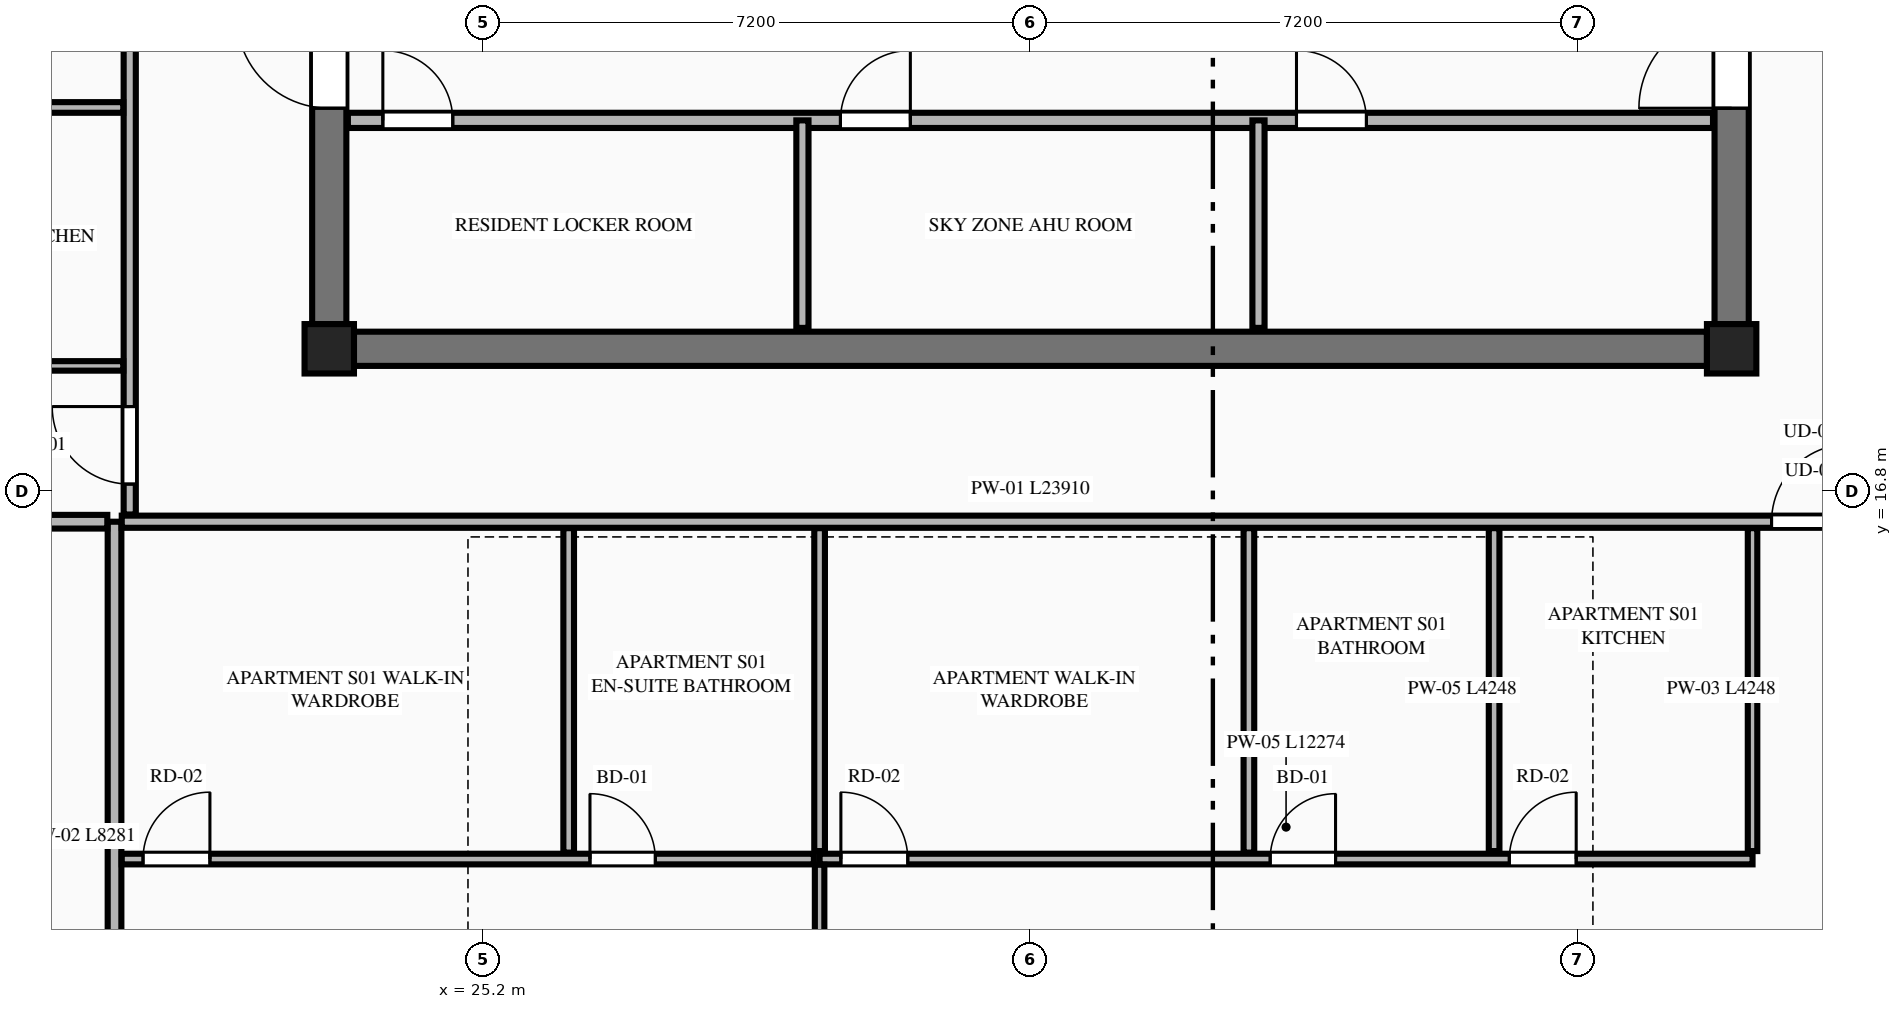
"""IFC4 building model, lengths in metres.
Left out: names, types, materials, properties, quantities, classifications, styles, units other than length and angle.
Written with IfcOpenShell. Run it as: python <this file> out.ifc"""

import sys

from ifc_helpers import new_model, si_unit, direction, frame, frame_2d, origin, origin_2d, place, context, subcontext, project, spatial, rectangle, extrude, element, fill, save


model = new_model("IFC4")
c1 = context("Model", 3, precision=1e-05, world=origin(), true_north=direction((0.0, 1.0)))
c2 = subcontext(c1, "Body", "Model", "MODEL_VIEW")
j1 = project(units=[si_unit("LENGTHUNIT", "METRE"), si_unit("PLANEANGLEUNIT", "RADIAN")], contexts=[c1])
p1 = place(None, origin())
s1 = spatial("IfcSite", under=j1, at=p1, CompositionType="ELEMENT")
p2 = place(p1, origin())
s2 = spatial("IfcBuilding", under=s1, at=p2, CompositionType="ELEMENT")
p3 = place(p2, frame((0.0, 0.0, 287.5)))
s3 = spatial("IfcBuildingStorey", under=s2, at=p3, CompositionType="ELEMENT", Elevation=287.5)
for number, where, z_axis, x_axis in (
    (1, (23.175, 18.675, 0.0), (0.0, 0.0, 1.0), (1.0, 0.0, 0.0)),
    (2, (41.625, 18.675, 0.0), (0.0, 0.0, 1.0), (1.0, 0.0, 0.0)),
):
    element("IfcColumn", number, at=place(p3, frame(where, z_axis=z_axis, x_axis=x_axis)), inside=s3, PredefinedType="COLUMN", context=c2, shape_type="SweptSolid", body=[
        extrude(rectangle(XDim=0.65, YDim=0.65, at=origin_2d()), origin(), (0.0, 0.0, 1.0), 4.0),
    ])
p4 = place(p3, frame((23.5, 18.675, 0.0), z_axis=(0.0, 0.0, 1.0), x_axis=(1.0, 0.0, 0.0)))
e3 = element("IfcWall", 3, at=p4, inside=s3, PredefinedType="SHEAR", context=c2, shape_type="SweptSolid", body=[
    extrude(rectangle(XDim=17.8, YDim=0.45, at=frame_2d((8.9, 0.0))), origin(), (0.0, 0.0, 1.0), 3.8),
])
p5 = place(p3, frame((23.175, 19.0, 0.0), z_axis=(0.0, 0.0, 1.0), x_axis=(0.0, 1.0, 0.0)))
e4 = element("IfcWall", 4, at=p5, inside=s3, PredefinedType="SHEAR", context=c2, shape_type="SweptSolid", body=[
    extrude(rectangle(XDim=13.8, YDim=0.45, at=frame_2d((6.9, 0.0))), origin(), (0.0, 0.0, 1.0), 3.8),
])
p6 = place(p5, frame((2.84, 0.0, 0.0)))
e5 = element("IfcOpeningElement", 5, at=p6, cuts=e4, PredefinedType="OPENING", context=c2, shape_type="SweptSolid", body=[
    extrude(rectangle(XDim=1.22, YDim=2.25, at=frame_2d((0.61, 1.125))), frame((0.0, 0.235, 0.0), z_axis=(0.0, -1.0, 0.0), x_axis=(1.0, 0.0, 0.0)), (0.0, 0.0, 1.0), 0.47),
])
p7 = place(p3, frame((41.625, 19.0, 0.0), z_axis=(0.0, 0.0, 1.0), x_axis=(0.0, 1.0, 0.0)))
e6 = element("IfcWall", 6, at=p7, inside=s3, PredefinedType="SHEAR", context=c2, shape_type="SweptSolid", body=[
    extrude(rectangle(XDim=13.8, YDim=0.45, at=frame_2d((6.9, 0.0))), origin(), (0.0, 0.0, 1.0), 3.8),
])
p8 = place(p7, frame((2.84, 0.0, 0.0)))
e7 = element("IfcOpeningElement", 7, at=p8, cuts=e6, PredefinedType="OPENING", context=c2, shape_type="SweptSolid", body=[
    extrude(rectangle(XDim=1.22, YDim=2.25, at=frame_2d((0.61, 1.125))), frame((0.0, 0.235, 0.0), z_axis=(0.0, -1.0, 0.0), x_axis=(1.0, 0.0, 0.0)), (0.0, 0.0, 1.0), 0.47),
])
p9 = place(p3, frame((23.42, 21.68, 0.0), z_axis=(0.0, 0.0, 1.0), x_axis=(1.0, 0.0, 0.0)))
e8 = element("IfcWall", 8, at=p9, inside=s3, PredefinedType="PLUMBINGWALL", context=c2, shape_type="SweptSolid", body=[
    extrude(rectangle(XDim=17.96, YDim=0.2, at=frame_2d((8.98, 0.0))), origin(), (0.0, 0.0, 1.0), 3.8),
])
p10 = place(p9, frame((0.46, 0.0, 0.0)))
e9 = element("IfcOpeningElement", 9, at=p10, cuts=e8, PredefinedType="OPENING", context=c2, shape_type="SweptSolid", body=[
    extrude(rectangle(XDim=0.92, YDim=2.15, at=frame_2d((0.46, 1.075))), frame((0.0, 0.11, 0.0), z_axis=(0.0, -1.0, 0.0), x_axis=(1.0, 0.0, 0.0)), (0.0, 0.0, 1.0), 0.22),
])
p11 = place(p9, frame((6.48, 0.0, 0.0)))
e10 = element("IfcOpeningElement", 10, at=p11, cuts=e8, PredefinedType="OPENING", context=c2, shape_type="SweptSolid", body=[
    extrude(rectangle(XDim=0.92, YDim=2.15, at=frame_2d((0.46, 1.075))), frame((0.0, 0.11, 0.0), z_axis=(0.0, -1.0, 0.0), x_axis=(1.0, 0.0, 0.0)), (0.0, 0.0, 1.0), 0.22),
])
p12 = place(p9, frame((12.48, 0.0, 0.0)))
e11 = element("IfcOpeningElement", 11, at=p12, cuts=e8, PredefinedType="OPENING", context=c2, shape_type="SweptSolid", body=[
    extrude(rectangle(XDim=0.92, YDim=2.15, at=frame_2d((0.46, 1.075))), frame((0.0, 0.11, 0.0), z_axis=(0.0, -1.0, 0.0), x_axis=(1.0, 0.0, 0.0)), (0.0, 0.0, 1.0), 0.22),
])
for number, where, z_axis, x_axis in (
    (12, (29.4, 18.95, 0.0), (0.0, 0.0, 1.0), (0.0, 1.0, 0.0)),
    (13, (35.4, 18.95, 0.0), (0.0, 0.0, 1.0), (0.0, 1.0, 0.0)),
):
    element("IfcWall", number, at=place(p3, frame(where, z_axis=z_axis, x_axis=x_axis)), inside=s3, PredefinedType="PARTITIONING", context=c2, shape_type="SweptSolid", body=[
        extrude(rectangle(XDim=2.73, YDim=0.16, at=frame_2d((1.365, 0.0))), origin(), (0.0, 0.0, 1.0), 3.8),
    ])
p13 = place(p3, frame((20.35, 8.119, 0.0), z_axis=(0.0, 0.0, 1.0), x_axis=(0.0, 1.0, 0.0)))
e14 = element("IfcWall", 14, at=p13, inside=s3, PredefinedType="PARTITIONING", context=c2, shape_type="SweptSolid", body=[
    extrude(rectangle(XDim=8.281, YDim=0.18, at=frame_2d((4.141, 0.0))), origin(), (0.0, 0.0, 1.0), 3.8),
])
p14 = place(p3, frame((20.445, 16.4, 0.0), z_axis=(0.0, 0.0, 1.0), x_axis=(1.0, 0.0, 0.0)))
e15 = element("IfcWall", 15, at=p14, inside=s3, PredefinedType="PARTITIONING", context=c2, shape_type="SweptSolid", body=[
    extrude(rectangle(XDim=23.91, YDim=0.16, at=frame_2d((11.955, 0.0))), origin(), (0.0, 0.0, 1.0), 3.8),
])
p15 = place(p14, frame((21.705, 0.0, 0.0)))
e16 = element("IfcOpeningElement", 16, at=p15, cuts=e15, PredefinedType="OPENING", context=c2, shape_type="SweptSolid", body=[
    extrude(rectangle(XDim=1.02, YDim=2.25, at=frame_2d((0.51, 1.125))), frame((0.0, 0.09, 0.0), z_axis=(0.0, -1.0, 0.0), x_axis=(1.0, 0.0, 0.0)), (0.0, 0.0, 1.0), 0.18),
])
p16 = place(p3, frame((41.9, 12.067, 0.0), z_axis=(0.0, 0.0, 1.0), x_axis=(0.0, 1.0, 0.0)))
e17 = element("IfcWall", 17, at=p16, inside=s3, PredefinedType="PARTITIONING", context=c2, shape_type="SweptSolid", body=[
    extrude(rectangle(XDim=4.248, YDim=0.125, at=frame_2d((2.124, 0.0))), origin(), (0.0, 0.0, 1.0), 3.257),
])
p17 = place(p3, frame((29.626, 11.962, 0.0), z_axis=(0.0, 0.0, 1.0), x_axis=(1.0, 0.0, 0.0)))
e18 = element("IfcWall", 18, at=p17, inside=s3, PredefinedType="PLUMBINGWALL", context=c2, shape_type="SweptSolid", body=[
    extrude(rectangle(XDim=12.274, YDim=0.14, at=frame_2d((6.137, 0.0))), origin(), (0.0, 0.0, 1.0), 3.8),
])
p18 = place(p17, frame((0.28, 0.0, 0.0)))
e19 = element("IfcOpeningElement", 19, at=p18, cuts=e18, PredefinedType="OPENING", context=c2, shape_type="SweptSolid", body=[
    extrude(rectangle(XDim=0.88, YDim=2.15, at=frame_2d((0.44, 1.075))), frame((0.0, 0.08, 0.0), z_axis=(0.0, -1.0, 0.0), x_axis=(1.0, 0.0, 0.0)), (0.0, 0.0, 1.0), 0.16),
])
p19 = place(p17, frame((5.928, 0.0, 0.0)))
e20 = element("IfcOpeningElement", 20, at=p19, cuts=e18, PredefinedType="OPENING", context=c2, shape_type="SweptSolid", body=[
    extrude(rectangle(XDim=0.86, YDim=2.1, at=frame_2d((0.43, 1.05))), frame((0.0, 0.08, 0.0), z_axis=(0.0, -1.0, 0.0), x_axis=(1.0, 0.0, 0.0)), (0.0, 0.0, 1.0), 0.16),
])
p20 = place(p17, frame((9.074, 0.0, 0.0)))
e21 = element("IfcOpeningElement", 21, at=p20, cuts=e18, PredefinedType="OPENING", context=c2, shape_type="SweptSolid", body=[
    extrude(rectangle(XDim=0.88, YDim=2.15, at=frame_2d((0.44, 1.075))), frame((0.0, 0.08, 0.0), z_axis=(0.0, -1.0, 0.0), x_axis=(1.0, 0.0, 0.0)), (0.0, 0.0, 1.0), 0.16),
])
p21 = place(p3, frame((20.445, 11.962, 0.0), z_axis=(0.0, 0.0, 1.0), x_axis=(1.0, 0.0, 0.0)))
e22 = element("IfcWall", 22, at=p21, inside=s3, PredefinedType="PLUMBINGWALL", context=c2, shape_type="SweptSolid", body=[
    extrude(rectangle(XDim=9.106, YDim=0.14, at=frame_2d((4.553, 0.0))), origin(), (0.0, 0.0, 1.0), 3.8),
])
p22 = place(p21, frame((0.28, 0.0, 0.0)))
e23 = element("IfcOpeningElement", 23, at=p22, cuts=e22, PredefinedType="OPENING", context=c2, shape_type="SweptSolid", body=[
    extrude(rectangle(XDim=0.88, YDim=2.15, at=frame_2d((0.44, 1.075))), frame((0.0, 0.08, 0.0), z_axis=(0.0, -1.0, 0.0), x_axis=(1.0, 0.0, 0.0)), (0.0, 0.0, 1.0), 0.16),
])
p23 = place(p21, frame((6.16, 0.0, 0.0)))
e24 = element("IfcOpeningElement", 24, at=p23, cuts=e22, PredefinedType="OPENING", context=c2, shape_type="SweptSolid", body=[
    extrude(rectangle(XDim=0.86, YDim=2.1, at=frame_2d((0.43, 1.05))), frame((0.0, 0.08, 0.0), z_axis=(0.0, -1.0, 0.0), x_axis=(1.0, 0.0, 0.0)), (0.0, 0.0, 1.0), 0.16),
])
for number, where, z_axis, x_axis in (
    (25, (38.5, 12.067, 0.0), (0.0, 0.0, 1.0), (0.0, 1.0, 0.0)),
    (26, (29.626, 12.067, 0.0), (0.0, 0.0, 1.0), (0.0, 1.0, 0.0)),
):
    element("IfcWall", number, at=place(p3, frame(where, z_axis=z_axis, x_axis=x_axis)), inside=s3, PredefinedType="PLUMBINGWALL", context=c2, shape_type="SweptSolid", body=[
        extrude(rectangle(XDim=4.248, YDim=0.14, at=frame_2d((2.124, 0.0))), origin(), (0.0, 0.0, 1.0), 3.8),
    ])
p24 = place(p3, frame((29.626, 7.315, 0.0), z_axis=(0.0, 0.0, 1.0), x_axis=(0.0, 1.0, 0.0)))
e27 = element("IfcWall", 27, at=p24, inside=s3, PredefinedType="PARTITIONING", context=c2, shape_type="SweptSolid", body=[
    extrude(rectangle(XDim=4.572, YDim=0.125, at=frame_2d((2.286, 0.0))), origin(), (0.0, 0.0, 1.0), 3.8),
])
p25 = place(p24, frame((1.05, 0.0, 0.0)))
e28 = element("IfcOpeningElement", 28, at=p25, cuts=e27, PredefinedType="OPENING", context=c2, shape_type="SweptSolid", body=[
    extrude(rectangle(XDim=0.92, YDim=2.15, at=frame_2d((0.46, 1.075))), frame((0.0, 0.073, 0.0), z_axis=(0.0, -1.0, 0.0), x_axis=(1.0, 0.0, 0.0)), (0.0, 0.0, 1.0), 0.145),
])
for number, where, z_axis, x_axis in (
    (29, (35.274, 12.047, 0.0), (0.0, 0.0, 1.0), (0.0, 1.0, 0.0)),
    (30, (26.325, 12.047, 0.0), (0.0, 0.0, 1.0), (0.0, 1.0, 0.0)),
):
    element("IfcWall", number, at=place(p3, frame(where, z_axis=z_axis, x_axis=x_axis)), inside=s3, PredefinedType="PLUMBINGWALL", context=c2, shape_type="SweptSolid", body=[
        extrude(rectangle(XDim=4.268, YDim=0.14, at=frame_2d((2.134, 0.0))), origin(), (0.0, 0.0, 1.0), 3.8),
    ])
p26 = place(p3, frame((16.034, 16.4, 0.0), z_axis=(0.0, 0.0, 1.0), x_axis=(1.0, 0.0, 0.0)))
e31 = element("IfcWall", 31, at=p26, inside=s3, PredefinedType="PARTITIONING", context=c2, shape_type="SweptSolid", body=[
    extrude(rectangle(XDim=4.221, YDim=0.18, at=frame_2d((2.11, 0.0))), origin(), (0.0, 0.0, 1.0), 3.8),
])
p27 = place(p3, frame((20.55, 16.495, 0.0), z_axis=(0.0, 0.0, 1.0), x_axis=(0.0, 1.0, 0.0)))
e32 = element("IfcWall", 32, at=p27, inside=s3, PredefinedType="PARTITIONING", context=c2, shape_type="SweptSolid", body=[
    extrude(rectangle(XDim=18.41, YDim=0.16, at=frame_2d((9.205, 0.0))), origin(), (0.0, 0.0, 1.0), 3.487),
])
p28 = place(p27, frame((0.4, 0.0, 0.0)))
e33 = element("IfcOpeningElement", 33, at=p28, cuts=e32, PredefinedType="OPENING", context=c2, shape_type="SweptSolid", body=[
    extrude(rectangle(XDim=1.02, YDim=2.25, at=frame_2d((0.51, 1.125))), frame((0.0, 0.09, 0.0), z_axis=(0.0, -1.0, 0.0), x_axis=(1.0, 0.0, 0.0)), (0.0, 0.0, 1.0), 0.18),
])
p29 = place(p3, frame((16.785, 18.45, 0.0), z_axis=(0.0, 0.0, 1.0), x_axis=(1.0, 0.0, 0.0)))
e34 = element("IfcWall", 34, at=p29, inside=s3, PredefinedType="PARTITIONING", context=c2, shape_type="SweptSolid", body=[
    extrude(rectangle(XDim=3.68, YDim=0.125, at=frame_2d((1.84, 0.0))), origin(), (0.0, 0.0, 1.0), 3.8),
])
p30 = place(p3, frame((16.785, 21.85, 0.0), z_axis=(0.0, 0.0, 1.0), x_axis=(1.0, 0.0, 0.0)))
e35 = element("IfcWall", 35, at=p30, inside=s3, PredefinedType="PLUMBINGWALL", context=c2, shape_type="SweptSolid", body=[
    extrude(rectangle(XDim=3.68, YDim=0.14, at=frame_2d((1.84, 0.0))), origin(), (0.0, 0.0, 1.0), 3.8),
])
p31 = place(p6, origin())
e36 = element("IfcDoor", 36, at=p31, inside=s3, OperationType="SINGLE_SWING_RIGHT", PredefinedType="DOOR", context=c2, shape_type="SweptSolid", body=[
    extrude(rectangle(XDim=1.22, YDim=2.25, at=frame_2d((0.61, 1.125))), frame((0.0, 0.025, 0.0), z_axis=(0.0, -1.0, 0.0), x_axis=(1.0, 0.0, 0.0)), (0.0, 0.0, 1.0), 0.05),
])
fill(e5, e36)
p32 = place(p8, origin())
e37 = element("IfcDoor", 37, at=p32, inside=s3, OperationType="SINGLE_SWING_LEFT", PredefinedType="DOOR", context=c2, shape_type="SweptSolid", body=[
    extrude(rectangle(XDim=1.22, YDim=2.25, at=frame_2d((0.61, 1.125))), frame((0.0, 0.025, 0.0), z_axis=(0.0, -1.0, 0.0), x_axis=(1.0, 0.0, 0.0)), (0.0, 0.0, 1.0), 0.05),
])
fill(e7, e37)
p33 = place(p10, origin())
e38 = element("IfcDoor", 38, at=p33, inside=s3, OperationType="SINGLE_SWING_LEFT", PredefinedType="DOOR", context=c2, shape_type="SweptSolid", body=[
    extrude(rectangle(XDim=0.92, YDim=2.15, at=frame_2d((0.46, 1.075))), frame((0.0, 0.025, 0.0), z_axis=(0.0, -1.0, 0.0), x_axis=(1.0, 0.0, 0.0)), (0.0, 0.0, 1.0), 0.05),
])
fill(e9, e38)
p34 = place(p11, origin())
e39 = element("IfcDoor", 39, at=p34, inside=s3, OperationType="SINGLE_SWING_RIGHT", PredefinedType="DOOR", context=c2, shape_type="SweptSolid", body=[
    extrude(rectangle(XDim=0.92, YDim=2.15, at=frame_2d((0.46, 1.075))), frame((0.0, 0.025, 0.0), z_axis=(0.0, -1.0, 0.0), x_axis=(1.0, 0.0, 0.0)), (0.0, 0.0, 1.0), 0.05),
])
fill(e10, e39)
p35 = place(p12, origin())
e40 = element("IfcDoor", 40, at=p35, inside=s3, OperationType="SINGLE_SWING_LEFT", PredefinedType="DOOR", context=c2, shape_type="SweptSolid", body=[
    extrude(rectangle(XDim=0.92, YDim=2.15, at=frame_2d((0.46, 1.075))), frame((0.0, 0.025, 0.0), z_axis=(0.0, -1.0, 0.0), x_axis=(1.0, 0.0, 0.0)), (0.0, 0.0, 1.0), 0.05),
])
fill(e11, e40)
p36 = place(p18, origin())
e41 = element("IfcDoor", 41, at=p36, inside=s3, OperationType="SINGLE_SWING_LEFT", PredefinedType="DOOR", context=c2, shape_type="SweptSolid", body=[
    extrude(rectangle(XDim=0.88, YDim=2.15, at=frame_2d((0.44, 1.075))), frame((0.0, 0.025, 0.0), z_axis=(0.0, -1.0, 0.0), x_axis=(1.0, 0.0, 0.0)), (0.0, 0.0, 1.0), 0.05),
])
fill(e19, e41)
p37 = place(p19, origin())
e42 = element("IfcDoor", 42, at=p37, inside=s3, OperationType="SINGLE_SWING_RIGHT", PredefinedType="DOOR", context=c2, shape_type="SweptSolid", body=[
    extrude(rectangle(XDim=0.86, YDim=2.1, at=frame_2d((0.43, 1.05))), frame((0.0, 0.025, 0.0), z_axis=(0.0, -1.0, 0.0), x_axis=(1.0, 0.0, 0.0)), (0.0, 0.0, 1.0), 0.05),
])
fill(e20, e42)
p38 = place(p22, origin())
e43 = element("IfcDoor", 43, at=p38, inside=s3, OperationType="SINGLE_SWING_RIGHT", PredefinedType="DOOR", context=c2, shape_type="SweptSolid", body=[
    extrude(rectangle(XDim=0.88, YDim=2.15, at=frame_2d((0.44, 1.075))), frame((0.0, 0.025, 0.0), z_axis=(0.0, -1.0, 0.0), x_axis=(1.0, 0.0, 0.0)), (0.0, 0.0, 1.0), 0.05),
])
fill(e23, e43)
p39 = place(p23, origin())
e44 = element("IfcDoor", 44, at=p39, inside=s3, OperationType="SINGLE_SWING_LEFT", PredefinedType="DOOR", context=c2, shape_type="SweptSolid", body=[
    extrude(rectangle(XDim=0.86, YDim=2.1, at=frame_2d((0.43, 1.05))), frame((0.0, 0.025, 0.0), z_axis=(0.0, -1.0, 0.0), x_axis=(1.0, 0.0, 0.0)), (0.0, 0.0, 1.0), 0.05),
])
fill(e24, e44)
p40 = place(p15, origin())
e45 = element("IfcDoor", 45, at=p40, inside=s3, OperationType="SINGLE_SWING_RIGHT", PredefinedType="DOOR", context=c2, shape_type="SweptSolid", body=[
    extrude(rectangle(XDim=1.02, YDim=2.25, at=frame_2d((0.51, 1.125))), frame((0.0, 0.025, 0.0), z_axis=(0.0, -1.0, 0.0), x_axis=(1.0, 0.0, 0.0)), (0.0, 0.0, 1.0), 0.05),
])
fill(e16, e45)
p41 = place(p20, origin())
e46 = element("IfcDoor", 46, at=p41, inside=s3, OperationType="SINGLE_SWING_RIGHT", PredefinedType="DOOR", context=c2, shape_type="SweptSolid", body=[
    extrude(rectangle(XDim=0.88, YDim=2.15, at=frame_2d((0.44, 1.075))), frame((0.0, 0.025, 0.0), z_axis=(0.0, -1.0, 0.0), x_axis=(1.0, 0.0, 0.0)), (0.0, 0.0, 1.0), 0.05),
])
fill(e21, e46)
p42 = place(p28, origin())
e47 = element("IfcDoor", 47, at=p42, inside=s3, OperationType="SINGLE_SWING_RIGHT", PredefinedType="DOOR", context=c2, shape_type="SweptSolid", body=[
    extrude(rectangle(XDim=1.02, YDim=2.25, at=frame_2d((0.51, 1.125))), frame((0.0, 0.025, 0.0), z_axis=(0.0, -1.0, 0.0), x_axis=(1.0, 0.0, 0.0)), (0.0, 0.0, 1.0), 0.05),
])
fill(e33, e47)
save(model, sys.argv[1])
